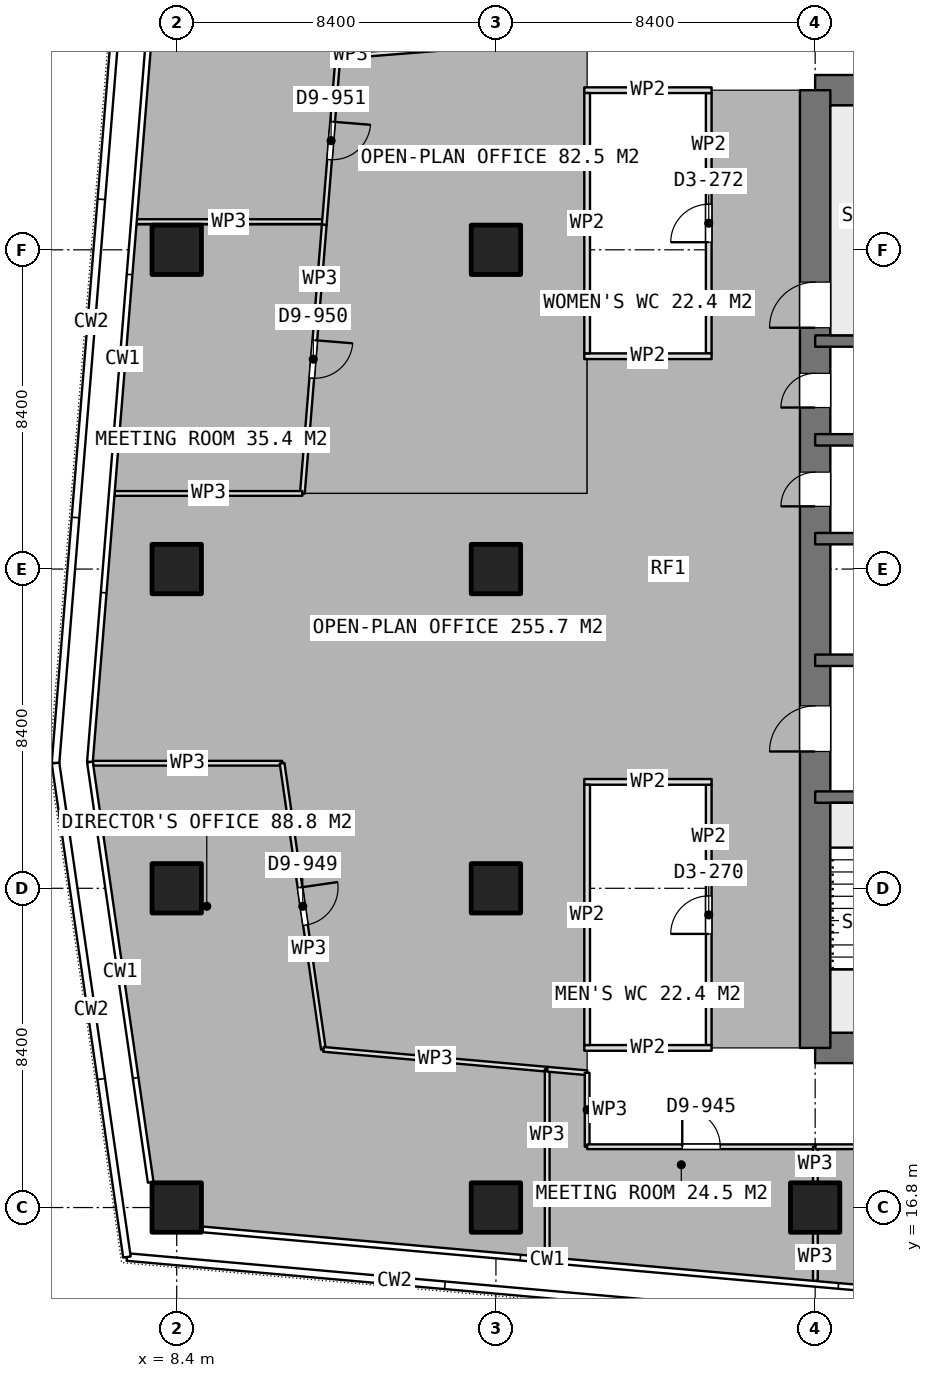
"""IFC4 building model, lengths in metres.
Left out: names, types, materials, properties, quantities, classifications, styles, units other than length and angle.
Written with IfcOpenShell. Run it as: python <this file> out.ifc"""

import sys

from ifc_helpers import new_model, si_unit, direction, frame, frame_2d, origin, origin_2d, place, context, subcontext, project, spatial, rectangle, extrude, element, fill, save


model = new_model("IFC4")
c1 = context("Model", 3, precision=1e-05, world=origin(), true_north=direction((0.0, 1.0)))
c2 = subcontext(c1, "Body", "Model", "MODEL_VIEW")
j1 = project(units=[si_unit("LENGTHUNIT", "METRE"), si_unit("PLANEANGLEUNIT", "RADIAN")], contexts=[c1])
p1 = place(None, origin())
s1 = spatial("IfcSite", under=j1, at=p1, CompositionType="ELEMENT")
p2 = place(p1, origin())
s2 = spatial("IfcBuilding", under=s1, at=p2, CompositionType="ELEMENT")
p3 = place(p2, frame((0.0, 0.0, 253.85)))
s3 = spatial("IfcBuildingStorey", under=s2, at=p3, CompositionType="ELEMENT", Elevation=253.85)
for number, where, z_axis, x_axis in (
    (1, (25.2, 21.0, 0.0), (0.0, 0.0, 1.0), (1.0, 0.0, 0.0)),
    (2, (25.2, 46.2, 0.0), (0.0, 0.0, 1.0), (1.0, 0.0, 0.0)),
):
    element("IfcWall", number, at=place(p3, frame(where, z_axis=z_axis, x_axis=x_axis)), inside=s3, PredefinedType="SHEAR", context=c2, shape_type="SweptSolid", body=[
        extrude(rectangle(XDim=10.4, YDim=0.8, at=frame_2d((5.2, 0.0))), origin(), (0.0, 0.0, 1.0), 3.75),
    ])
p4 = place(p3, frame((25.2, 21.0, 0.0), z_axis=(0.0, 0.0, 1.0), x_axis=(0.0, 1.0, 0.0)))
e3 = element("IfcWall", 3, at=p4, inside=s3, PredefinedType="SHEAR", context=c2, shape_type="SweptSolid", body=[
    extrude(rectangle(XDim=25.2, YDim=0.8, at=frame_2d((12.6, 0.0))), origin(), (0.0, 0.0, 1.0), 3.75),
])
p5 = place(p4, frame((7.8, 0.0, 0.0)))
e4 = element("IfcOpeningElement", 4, at=p5, cuts=e3, PredefinedType="OPENING", context=c2, shape_type="SweptSolid", body=[
    extrude(rectangle(XDim=1.2, YDim=2.1, at=frame_2d((0.6, 1.05))), frame((0.0, 0.41, 0.0), z_axis=(0.0, -1.0, 0.0), x_axis=(1.0, 0.0, 0.0)), (0.0, 0.0, 1.0), 0.82),
])
p6 = place(p4, frame((14.25, 0.0, 0.0)))
e5 = element("IfcOpeningElement", 5, at=p6, cuts=e3, PredefinedType="OPENING", context=c2, shape_type="SweptSolid", body=[
    extrude(rectangle(XDim=0.9, YDim=2.1, at=frame_2d((0.45, 1.05))), frame((0.0, 0.41, 0.0), z_axis=(0.0, -1.0, 0.0), x_axis=(1.0, 0.0, 0.0)), (0.0, 0.0, 1.0), 0.82),
])
p7 = place(p4, frame((16.85, 0.0, 0.0)))
e6 = element("IfcOpeningElement", 6, at=p7, cuts=e3, PredefinedType="OPENING", context=c2, shape_type="SweptSolid", body=[
    extrude(rectangle(XDim=0.9, YDim=2.1, at=frame_2d((0.45, 1.05))), frame((0.0, 0.41, 0.0), z_axis=(0.0, -1.0, 0.0), x_axis=(1.0, 0.0, 0.0)), (0.0, 0.0, 1.0), 0.82),
])
p8 = place(p4, frame((18.95, 0.0, 0.0)))
e7 = element("IfcOpeningElement", 7, at=p8, cuts=e3, PredefinedType="OPENING", context=c2, shape_type="SweptSolid", body=[
    extrude(rectangle(XDim=1.2, YDim=2.1, at=frame_2d((0.6, 1.05))), frame((0.0, 0.41, 0.0), z_axis=(0.0, -1.0, 0.0), x_axis=(1.0, 0.0, 0.0)), (0.0, 0.0, 1.0), 0.82),
])
p9 = place(p3, frame((25.2, 27.6, 0.0), z_axis=(0.0, 0.0, 1.0), x_axis=(1.0, 0.0, 0.0)))
e8 = element("IfcWall", 8, at=p9, inside=s3, PredefinedType="SHEAR", context=c2, shape_type="SweptSolid", body=[
    extrude(rectangle(XDim=6.6, YDim=0.3, at=frame_2d((3.3, 0.0))), origin(), (0.0, 0.0, 1.0), 3.75),
])
p10 = place(p9, frame((5.05, 0.0, 0.0)))
e9 = element("IfcOpeningElement", 9, at=p10, cuts=e8, PredefinedType="OPENING", context=c2, shape_type="SweptSolid", body=[
    extrude(rectangle(XDim=1.2, YDim=2.1, at=frame_2d((0.6, 1.05))), frame((0.0, 0.16, 0.0), z_axis=(0.0, -1.0, 0.0), x_axis=(1.0, 0.0, 0.0)), (0.0, 0.0, 1.0), 0.32),
])
p11 = place(p3, frame((25.2, 31.2, 0.0), z_axis=(0.0, 0.0, 1.0), x_axis=(1.0, 0.0, 0.0)))
e10 = element("IfcWall", 10, at=p11, inside=s3, PredefinedType="SHEAR", context=c2, shape_type="SweptSolid", body=[
    extrude(rectangle(XDim=6.6, YDim=0.3, at=frame_2d((3.3, 0.0))), origin(), (0.0, 0.0, 1.0), 3.75),
])
p12 = place(p11, frame((2.65, 0.0, 0.0)))
e11 = element("IfcOpeningElement", 11, at=p12, cuts=e10, PredefinedType="OPENING", context=c2, shape_type="SweptSolid", body=[
    extrude(rectangle(XDim=1.3, YDim=2.1, at=frame_2d((0.65, 1.05))), frame((0.0, 0.16, 0.0), z_axis=(0.0, -1.0, 0.0), x_axis=(1.0, 0.0, 0.0)), (0.0, 0.0, 1.0), 0.32),
])
for number, where, z_axis, x_axis in (
    (12, (25.2, 34.4, 0.0), (0.0, 0.0, 1.0), (1.0, 0.0, 0.0)),
    (13, (25.2, 37.0, 0.0), (0.0, 0.0, 1.0), (1.0, 0.0, 0.0)),
    (14, (25.2, 39.6, 0.0), (0.0, 0.0, 1.0), (1.0, 0.0, 0.0)),
):
    element("IfcWall", number, at=place(p3, frame(where, z_axis=z_axis, x_axis=x_axis)), inside=s3, PredefinedType="SHEAR", context=c2, shape_type="SweptSolid", body=[
        extrude(rectangle(XDim=6.6, YDim=0.3, at=frame_2d((3.3, 0.0))), origin(), (0.0, 0.0, 1.0), 3.75),
    ])
for number, where, z_axis, x_axis in (
    (15, (8.4, 16.8, 0.0), (0.0, 0.0, 1.0), (1.0, 0.0, 0.0)),
    (16, (8.4, 25.2, 0.0), (0.0, 0.0, 1.0), (1.0, 0.0, 0.0)),
    (17, (8.4, 33.6, 0.0), (0.0, 0.0, 1.0), (1.0, 0.0, 0.0)),
    (18, (8.4, 42.0, 0.0), (0.0, 0.0, 1.0), (1.0, 0.0, 0.0)),
    (19, (16.8, 16.8, 0.0), (0.0, 0.0, 1.0), (1.0, 0.0, 0.0)),
    (20, (16.8, 25.2, 0.0), (0.0, 0.0, 1.0), (1.0, 0.0, 0.0)),
    (21, (16.8, 33.6, 0.0), (0.0, 0.0, 1.0), (1.0, 0.0, 0.0)),
    (22, (16.8, 42.0, 0.0), (0.0, 0.0, 1.0), (1.0, 0.0, 0.0)),
    (23, (25.2, 16.8, 0.0), (0.0, 0.0, 1.0), (1.0, 0.0, 0.0)),
):
    element("IfcColumn", number, at=place(p3, frame(where, z_axis=z_axis, x_axis=x_axis)), inside=s3, PredefinedType="COLUMN", context=c2, shape_type="SweptSolid", body=[
        extrude(rectangle(XDim=1.3, YDim=1.3, at=origin_2d()), origin(), (0.0, 0.0, 1.0), 3.75),
    ])
for number, where, z_axis, x_axis in (
    (24, (19.125, 39.2, 0.0), (0.0, 0.0, 1.0), (1.0, 0.0, 0.0)),
    (25, (19.125, 46.2, 0.0), (0.0, 0.0, 1.0), (1.0, 0.0, 0.0)),
):
    element("IfcWall", number, at=place(p3, frame(where, z_axis=z_axis, x_axis=x_axis)), inside=s3, PredefinedType="PARTITIONING", context=c2, shape_type="SweptSolid", body=[
        extrude(rectangle(XDim=3.35, YDim=0.15, at=frame_2d((1.675, 0.0))), origin(), (0.0, 0.0, 1.0), 3.5),
    ])
p13 = place(p3, frame((19.2, 39.275, 0.0), z_axis=(0.0, 0.0, 1.0), x_axis=(0.0, 1.0, 0.0)))
e26 = element("IfcWall", 26, at=p13, inside=s3, PredefinedType="PARTITIONING", context=c2, shape_type="SweptSolid", body=[
    extrude(rectangle(XDim=6.85, YDim=0.15, at=frame_2d((3.425, 0.0))), origin(), (0.0, 0.0, 1.0), 3.5),
])
p14 = place(p3, frame((22.4, 39.275, 0.0), z_axis=(0.0, 0.0, 1.0), x_axis=(0.0, 1.0, 0.0)))
e27 = element("IfcWall", 27, at=p14, inside=s3, PredefinedType="PARTITIONING", context=c2, shape_type="SweptSolid", body=[
    extrude(rectangle(XDim=6.85, YDim=0.15, at=frame_2d((3.425, 0.0))), origin(), (0.0, 0.0, 1.0), 3.5),
])
p15 = place(p14, frame((2.925, 0.0, 0.0)))
e28 = element("IfcOpeningElement", 28, at=p15, cuts=e27, PredefinedType="OPENING", context=c2, shape_type="SweptSolid", body=[
    extrude(rectangle(XDim=1.0, YDim=2.1, at=frame_2d((0.5, 1.05))), frame((0.0, 0.085, 0.0), z_axis=(0.0, -1.0, 0.0), x_axis=(1.0, 0.0, 0.0)), (0.0, 0.0, 1.0), 0.17),
])
for number, where, z_axis, x_axis in (
    (29, (19.125, 21.0, 0.0), (0.0, 0.0, 1.0), (1.0, 0.0, 0.0)),
    (30, (19.125, 28.0, 0.0), (0.0, 0.0, 1.0), (1.0, 0.0, 0.0)),
):
    element("IfcWall", number, at=place(p3, frame(where, z_axis=z_axis, x_axis=x_axis)), inside=s3, PredefinedType="PARTITIONING", context=c2, shape_type="SweptSolid", body=[
        extrude(rectangle(XDim=3.35, YDim=0.15, at=frame_2d((1.675, 0.0))), origin(), (0.0, 0.0, 1.0), 3.5),
    ])
p16 = place(p3, frame((19.2, 21.075, 0.0), z_axis=(0.0, 0.0, 1.0), x_axis=(0.0, 1.0, 0.0)))
e31 = element("IfcWall", 31, at=p16, inside=s3, PredefinedType="PARTITIONING", context=c2, shape_type="SweptSolid", body=[
    extrude(rectangle(XDim=6.85, YDim=0.15, at=frame_2d((3.425, 0.0))), origin(), (0.0, 0.0, 1.0), 3.5),
])
p17 = place(p3, frame((22.4, 21.075, 0.0), z_axis=(0.0, 0.0, 1.0), x_axis=(0.0, 1.0, 0.0)))
e32 = element("IfcWall", 32, at=p17, inside=s3, PredefinedType="PARTITIONING", context=c2, shape_type="SweptSolid", body=[
    extrude(rectangle(XDim=6.85, YDim=0.15, at=frame_2d((3.425, 0.0))), origin(), (0.0, 0.0, 1.0), 3.5),
])
p18 = place(p17, frame((2.925, 0.0, 0.0)))
e33 = element("IfcOpeningElement", 33, at=p18, cuts=e32, PredefinedType="OPENING", context=c2, shape_type="SweptSolid", body=[
    extrude(rectangle(XDim=1.0, YDim=2.1, at=frame_2d((0.5, 1.05))), frame((0.0, 0.085, 0.0), z_axis=(0.0, -1.0, 0.0), x_axis=(1.0, 0.0, 0.0)), (0.0, 0.0, 1.0), 0.17),
])
p19 = place(p3, frame((12.226, 42.742, 0.0), z_axis=(0.0, 0.0, 1.0), x_axis=(-1.0, 0.0, 0.0)))
e34 = element("IfcWall", 34, at=p19, inside=s3, PredefinedType="PARTITIONING", context=c2, shape_type="SweptSolid", body=[
    extrude(rectangle(XDim=4.903, YDim=0.125, at=frame_2d((2.452, 0.0))), origin(), (0.0, 0.0, 1.0), 3.5),
])
p20 = place(p3, frame((15.95, 47.351, 0.0), z_axis=(0.0, 0.0, 1.0), x_axis=(-0.99682463174, -0.07962822086, 0.0)))
e35 = element("IfcWall", 35, at=p20, inside=s3, PredefinedType="PARTITIONING", context=c2, shape_type="SweptSolid", body=[
    extrude(rectangle(XDim=3.317, YDim=0.125, at=frame_2d((1.659, 0.0))), origin(), (0.0, 0.0, 1.0), 3.5),
])
p21 = place(p3, frame((12.643, 47.087, 0.0), z_axis=(0.0, 0.0, 1.0), x_axis=(-0.081240627764, -0.996694517092, 0.0)))
e36 = element("IfcWall", 36, at=p21, inside=s3, PredefinedType="PARTITIONING", context=c2, shape_type="SweptSolid", body=[
    extrude(rectangle(XDim=4.445, YDim=0.125, at=frame_2d((2.222, 0.0))), origin(), (0.0, 0.0, 1.0), 3.5),
])
p22 = place(p21, frame((1.722, 0.0, 0.0)))
e37 = element("IfcOpeningElement", 37, at=p22, cuts=e36, PredefinedType="OPENING", context=c2, shape_type="SweptSolid", body=[
    extrude(rectangle(XDim=1.0, YDim=2.1, at=frame_2d((0.5, 1.05))), frame((0.0, 0.073, 0.0), z_axis=(0.0, -1.0, 0.0), x_axis=(1.0, 0.0, 0.0)), (0.0, 0.0, 1.0), 0.145),
])
p23 = place(p3, frame((12.282, 42.656, 0.0), z_axis=(0.0, 0.0, 1.0), x_axis=(-0.08110159124, -0.996705840205, 0.0)))
e38 = element("IfcWall", 38, at=p23, inside=s3, PredefinedType="PARTITIONING", context=c2, shape_type="SweptSolid", body=[
    extrude(rectangle(XDim=7.089, YDim=0.125, at=frame_2d((3.545, 0.0))), origin(), (0.0, 0.0, 1.0), 3.5),
])
p24 = place(p23, frame((3.045, 0.0, 0.0)))
e39 = element("IfcOpeningElement", 39, at=p24, cuts=e38, PredefinedType="OPENING", context=c2, shape_type="SweptSolid", body=[
    extrude(rectangle(XDim=1.0, YDim=2.1, at=frame_2d((0.5, 1.05))), frame((0.0, 0.073, 0.0), z_axis=(0.0, -1.0, 0.0), x_axis=(1.0, 0.0, 0.0)), (0.0, 0.0, 1.0), 0.145),
])
p25 = place(p3, frame((11.707, 35.59, 0.0), z_axis=(0.0, 0.0, 1.0), x_axis=(-1.0, 0.0, 0.0)))
e40 = element("IfcWall", 40, at=p25, inside=s3, PredefinedType="PARTITIONING", context=c2, shape_type="SweptSolid", body=[
    extrude(rectangle(XDim=4.936, YDim=0.125, at=frame_2d((2.468, 0.0))), origin(), (0.0, 0.0, 1.0), 3.5),
])
p26 = place(p3, frame((6.201, 28.491, 0.0), z_axis=(0.0, 0.0, 1.0), x_axis=(1.0, 0.0, 0.0)))
e41 = element("IfcWall", 41, at=p26, inside=s3, PredefinedType="PARTITIONING", context=c2, shape_type="SweptSolid", body=[
    extrude(rectangle(XDim=4.972, YDim=0.125, at=frame_2d((2.486, 0.0))), origin(), (0.0, 0.0, 1.0), 3.5),
])
p27 = place(p3, frame((11.173, 28.491, 0.0), z_axis=(0.0, 0.0, 1.0), x_axis=(0.143007219795, -0.989721645255, 0.0)))
e42 = element("IfcWall", 42, at=p27, inside=s3, PredefinedType="PARTITIONING", context=c2, shape_type="SweptSolid", body=[
    extrude(rectangle(XDim=7.607, YDim=0.125, at=frame_2d((3.804, 0.0))), origin(), (0.0, 0.0, 1.0), 3.5),
])
p28 = place(p27, frame((3.304, 0.0, 0.0)))
e43 = element("IfcOpeningElement", 43, at=p28, cuts=e42, PredefinedType="OPENING", context=c2, shape_type="SweptSolid", body=[
    extrude(rectangle(XDim=1.0, YDim=2.1, at=frame_2d((0.5, 1.05))), frame((0.0, 0.073, 0.0), z_axis=(0.0, -1.0, 0.0), x_axis=(1.0, 0.0, 0.0)), (0.0, 0.0, 1.0), 0.145),
])
p29 = place(p3, frame((12.261, 20.962, 0.0), z_axis=(0.0, 0.0, 1.0), x_axis=(0.996078951833, -0.08846876124, 0.0)))
e44 = element("IfcWall", 44, at=p29, inside=s3, PredefinedType="PARTITIONING", context=c2, shape_type="SweptSolid", body=[
    extrude(rectangle(XDim=5.911, YDim=0.125, at=frame_2d((2.956, 0.0))), origin(), (0.0, 0.0, 1.0), 3.5),
])
p30 = place(p3, frame((18.149, 20.439, 0.0), z_axis=(0.0, 0.0, 1.0), x_axis=(0.0, -1.0, 0.0)))
e45 = element("IfcWall", 45, at=p30, inside=s3, PredefinedType="PARTITIONING", context=c2, shape_type="SweptSolid", body=[
    extrude(rectangle(XDim=4.939, YDim=0.125, at=frame_2d((2.469, 0.0))), origin(), (0.0, 0.0, 1.0), 3.5),
])
p31 = place(p3, frame((18.15, 20.439, 0.0), z_axis=(0.0, 0.0, 1.0), x_axis=(0.996099374617, -0.088238517026, 0.0)))
e46 = element("IfcWall", 46, at=p31, inside=s3, PredefinedType="PARTITIONING", context=c2, shape_type="SweptSolid", body=[
    extrude(rectangle(XDim=1.054, YDim=0.125, at=frame_2d((0.527, 0.0))), origin(), (0.0, 0.0, 1.0), 3.5),
])
p32 = place(p3, frame((19.2, 20.346, 0.0), z_axis=(0.0, 0.0, 1.0), x_axis=(0.0, -1.0, 0.0)))
e47 = element("IfcWall", 47, at=p32, inside=s3, PredefinedType="PARTITIONING", context=c2, shape_type="SweptSolid", body=[
    extrude(rectangle(XDim=1.946, YDim=0.125, at=frame_2d((0.973, 0.0))), origin(), (0.0, 0.0, 1.0), 3.5),
])
p33 = place(p3, frame((19.2, 18.4, 0.0), z_axis=(0.0, 0.0, 1.0), x_axis=(1.0, 0.0, 0.0)))
e48 = element("IfcWall", 48, at=p33, inside=s3, PredefinedType="PARTITIONING", context=c2, shape_type="SweptSolid", body=[
    extrude(rectangle(XDim=6.006, YDim=0.125, at=frame_2d((3.003, 0.0))), origin(), (0.0, 0.0, 1.0), 3.5),
])
p34 = place(p33, frame((2.503, 0.0, 0.0)))
e49 = element("IfcOpeningElement", 49, at=p34, cuts=e48, PredefinedType="OPENING", context=c2, shape_type="SweptSolid", body=[
    extrude(rectangle(XDim=1.0, YDim=2.1, at=frame_2d((0.5, 1.05))), frame((0.0, 0.073, 0.0), z_axis=(0.0, -1.0, 0.0), x_axis=(1.0, 0.0, 0.0)), (0.0, 0.0, 1.0), 0.145),
])
p35 = place(p3, frame((25.206, 18.4, 0.0), z_axis=(0.0, 0.0, 1.0), x_axis=(0.0, -1.0, 0.0)))
e50 = element("IfcWall", 50, at=p35, inside=s3, PredefinedType="PARTITIONING", context=c2, shape_type="SweptSolid", body=[
    extrude(rectangle(XDim=0.93, YDim=0.125, at=frame_2d((0.465, 0.0))), origin(), (0.0, 0.0, 1.0), 3.5),
])
p36 = place(p3, frame((25.206, 16.13, 0.0), z_axis=(0.0, 0.0, 1.0), x_axis=(0.0, -1.0, 0.0)))
e51 = element("IfcWall", 51, at=p36, inside=s3, PredefinedType="PARTITIONING", context=c2, shape_type="SweptSolid", body=[
    extrude(rectangle(XDim=1.258, YDim=0.125, at=frame_2d((0.629, 0.0))), origin(), (0.0, 0.0, 1.0), 3.5),
])
p37 = place(p3, frame((25.207, 18.4, 0.0), z_axis=(0.0, 0.0, 1.0), x_axis=(1.0, 0.0, 0.0)))
e52 = element("IfcWall", 52, at=p37, inside=s3, PredefinedType="PARTITIONING", context=c2, shape_type="SweptSolid", body=[
    extrude(rectangle(XDim=9.297, YDim=0.125, at=frame_2d((4.648, 0.0))), origin(), (0.0, 0.0, 1.0), 3.5),
])
p38 = place(p37, frame((4.148, 0.0, 0.0)))
e53 = element("IfcOpeningElement", 53, at=p38, cuts=e52, PredefinedType="OPENING", context=c2, shape_type="SweptSolid", body=[
    extrude(rectangle(XDim=1.0, YDim=2.1, at=frame_2d((0.5, 1.05))), frame((0.0, 0.073, 0.0), z_axis=(0.0, -1.0, 0.0), x_axis=(1.0, 0.0, 0.0)), (0.0, 0.0, 1.0), 0.145),
])
p39 = place(p5, origin())
e54 = element("IfcDoor", 54, at=p39, inside=s3, OperationType="SINGLE_SWING_LEFT", PredefinedType="DOOR", context=c2, shape_type="SweptSolid", body=[
    extrude(rectangle(XDim=1.2, YDim=2.1, at=frame_2d((0.6, 1.05))), frame((0.0, 0.025, 0.0), z_axis=(0.0, -1.0, 0.0), x_axis=(1.0, 0.0, 0.0)), (0.0, 0.0, 1.0), 0.05),
])
fill(e4, e54)
p40 = place(p6, origin())
e55 = element("IfcDoor", 55, at=p40, inside=s3, OperationType="SINGLE_SWING_LEFT", PredefinedType="DOOR", context=c2, shape_type="SweptSolid", body=[
    extrude(rectangle(XDim=0.9, YDim=2.1, at=frame_2d((0.45, 1.05))), frame((0.0, 0.025, 0.0), z_axis=(0.0, -1.0, 0.0), x_axis=(1.0, 0.0, 0.0)), (0.0, 0.0, 1.0), 0.05),
])
fill(e5, e55)
p41 = place(p7, origin())
e56 = element("IfcDoor", 56, at=p41, inside=s3, OperationType="SINGLE_SWING_LEFT", PredefinedType="DOOR", context=c2, shape_type="SweptSolid", body=[
    extrude(rectangle(XDim=0.9, YDim=2.1, at=frame_2d((0.45, 1.05))), frame((0.0, 0.025, 0.0), z_axis=(0.0, -1.0, 0.0), x_axis=(1.0, 0.0, 0.0)), (0.0, 0.0, 1.0), 0.05),
])
fill(e6, e56)
p42 = place(p15, origin())
e57 = element("IfcDoor", 57, at=p42, inside=s3, OperationType="SINGLE_SWING_LEFT", PredefinedType="DOOR", context=c2, shape_type="SweptSolid", body=[
    extrude(rectangle(XDim=1.0, YDim=2.1, at=frame_2d((0.5, 1.05))), frame((0.0, 0.025, 0.0), z_axis=(0.0, -1.0, 0.0), x_axis=(1.0, 0.0, 0.0)), (0.0, 0.0, 1.0), 0.05),
])
fill(e28, e57)
p43 = place(p18, origin())
e58 = element("IfcDoor", 58, at=p43, inside=s3, OperationType="SINGLE_SWING_LEFT", PredefinedType="DOOR", context=c2, shape_type="SweptSolid", body=[
    extrude(rectangle(XDim=1.0, YDim=2.1, at=frame_2d((0.5, 1.05))), frame((0.0, 0.025, 0.0), z_axis=(0.0, -1.0, 0.0), x_axis=(1.0, 0.0, 0.0)), (0.0, 0.0, 1.0), 0.05),
])
fill(e33, e58)
p44 = place(p22, origin())
e59 = element("IfcDoor", 59, at=p44, inside=s3, OperationType="SINGLE_SWING_LEFT", PredefinedType="DOOR", context=c2, shape_type="SweptSolid", body=[
    extrude(rectangle(XDim=1.0, YDim=2.1, at=frame_2d((0.5, 1.05))), frame((0.0, 0.025, 0.0), z_axis=(0.0, -1.0, 0.0), x_axis=(1.0, 0.0, 0.0)), (0.0, 0.0, 1.0), 0.05),
])
fill(e37, e59)
p45 = place(p24, origin())
e60 = element("IfcDoor", 60, at=p45, inside=s3, OperationType="SINGLE_SWING_LEFT", PredefinedType="DOOR", context=c2, shape_type="SweptSolid", body=[
    extrude(rectangle(XDim=1.0, YDim=2.1, at=frame_2d((0.5, 1.05))), frame((0.0, 0.025, 0.0), z_axis=(0.0, -1.0, 0.0), x_axis=(1.0, 0.0, 0.0)), (0.0, 0.0, 1.0), 0.05),
])
fill(e39, e60)
p46 = place(p28, origin())
e61 = element("IfcDoor", 61, at=p46, inside=s3, OperationType="SINGLE_SWING_LEFT", PredefinedType="DOOR", context=c2, shape_type="SweptSolid", body=[
    extrude(rectangle(XDim=1.0, YDim=2.1, at=frame_2d((0.5, 1.05))), frame((0.0, 0.025, 0.0), z_axis=(0.0, -1.0, 0.0), x_axis=(1.0, 0.0, 0.0)), (0.0, 0.0, 1.0), 0.05),
])
fill(e43, e61)
p47 = place(p34, origin())
e62 = element("IfcDoor", 62, at=p47, inside=s3, OperationType="SINGLE_SWING_LEFT", PredefinedType="DOOR", context=c2, shape_type="SweptSolid", body=[
    extrude(rectangle(XDim=1.0, YDim=2.1, at=frame_2d((0.5, 1.05))), frame((0.0, 0.025, 0.0), z_axis=(0.0, -1.0, 0.0), x_axis=(1.0, 0.0, 0.0)), (0.0, 0.0, 1.0), 0.05),
])
fill(e49, e62)
p48 = place(p8, origin())
e63 = element("IfcDoor", 63, at=p48, inside=s3, OperationType="SINGLE_SWING_RIGHT", PredefinedType="DOOR", context=c2, shape_type="SweptSolid", body=[
    extrude(rectangle(XDim=1.2, YDim=2.1, at=frame_2d((0.6, 1.05))), frame((0.0, 0.025, 0.0), z_axis=(0.0, -1.0, 0.0), x_axis=(1.0, 0.0, 0.0)), (0.0, 0.0, 1.0), 0.05),
])
fill(e7, e63)
save(model, sys.argv[1])
